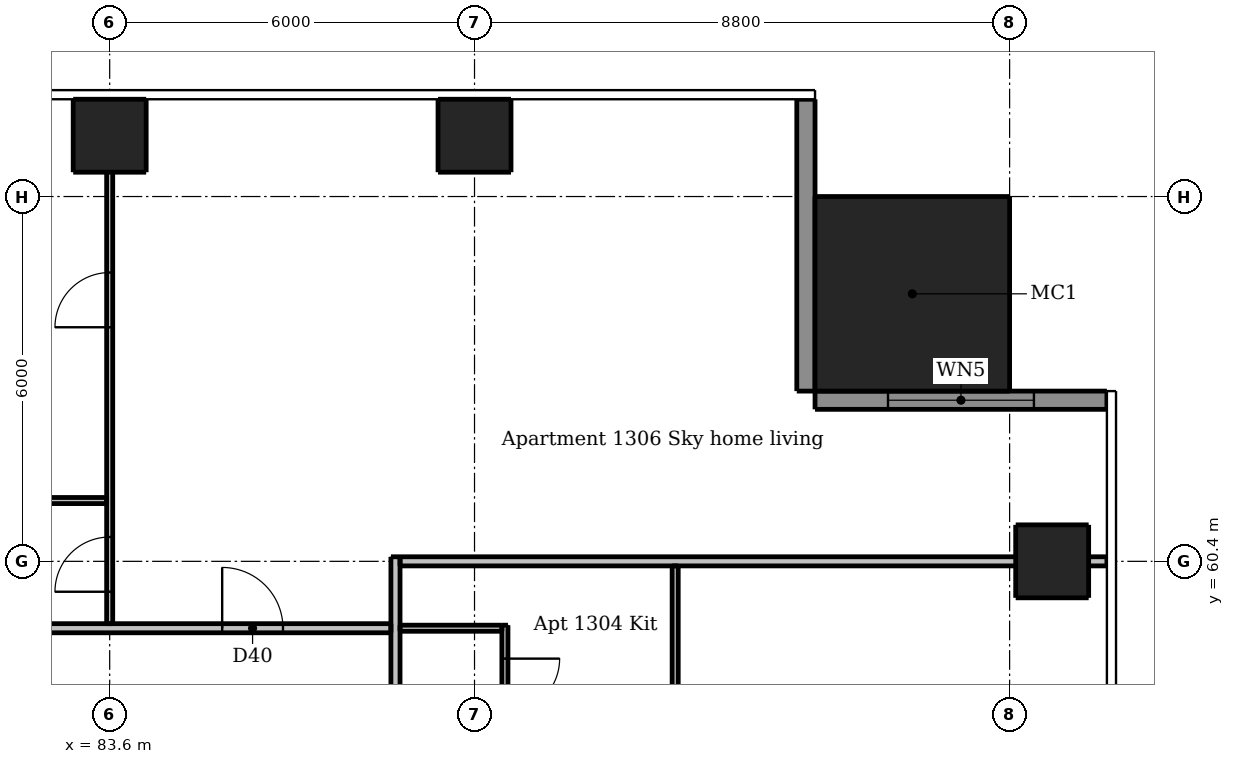
"""IFC4 building model, lengths in metres.
Left out: names, types, materials, properties, quantities, classifications, styles, units other than length and angle.
Written with IfcOpenShell. Run it as: python <this file> out.ifc"""

import sys

from ifc_helpers import new_model, si_unit, direction, frame, frame_2d, origin, origin_2d, place, context, subcontext, project, spatial, rectangle, extrude, element, fill, save


model = new_model("IFC4")
c1 = context("Model", 3, precision=1e-05, world=origin(), true_north=direction((0.0, 1.0)))
c2 = subcontext(c1, "Body", "Model", "MODEL_VIEW")
j1 = project(units=[si_unit("LENGTHUNIT", "METRE"), si_unit("PLANEANGLEUNIT", "RADIAN")], contexts=[c1])
p1 = place(None, origin())
s1 = spatial("IfcSite", under=j1, at=p1, CompositionType="ELEMENT")
p2 = place(p1, origin())
s2 = spatial("IfcBuilding", under=s1, at=p2, CompositionType="ELEMENT")
p3 = place(p2, frame((0.0, 0.0, 49.9)))
s3 = spatial("IfcBuildingStorey", under=s2, at=p3, CompositionType="ELEMENT", Elevation=49.9)
for number, where, z_axis, x_axis in (
    (1, (99.1, 60.4, 0.0), (0.0, 0.0, 1.0), (1.0, 0.0, 0.0)),
    (2, (83.6, 67.4, 0.0), (0.0, 0.0, 1.0), (1.0, 0.0, 0.0)),
    (3, (89.6, 67.4, 0.0), (0.0, 0.0, 1.0), (1.0, 0.0, 0.0)),
):
    element("IfcColumn", number, at=place(p3, frame(where, z_axis=z_axis, x_axis=x_axis)), inside=s3, PredefinedType="COLUMN", context=c2, shape_type="SweptSolid", body=[
        extrude(rectangle(XDim=1.2, YDim=1.2, at=origin_2d()), origin(), (0.0, 0.0, 1.0), 3.05),
    ])
p4 = place(p3, frame((96.8, 64.8, 0.0), z_axis=(0.0, 0.0, 1.0), x_axis=(1.0, 0.0, 0.0)))
e4 = element("IfcColumn", 4, at=p4, inside=s3, PredefinedType="COLUMN", context=c2, shape_type="SweptSolid", body=[
    extrude(rectangle(XDim=3.2, YDim=3.2, at=origin_2d()), origin(), (0.0, 0.0, 1.0), 3.3),
])
p5 = place(p3, frame((100.0, 63.05, 0.0), z_axis=(0.0, 0.0, 1.0), x_axis=(-1.0, 0.0, 0.0)))
e5 = element("IfcWall", 5, at=p5, inside=s3, PredefinedType="SOLIDWALL", context=c2, shape_type="SweptSolid", body=[
    extrude(rectangle(XDim=4.8, YDim=0.3, at=frame_2d((2.4, 0.0))), origin(), (0.0, 0.0, 1.0), 3.05),
])
p6 = place(p5, frame((1.2, 0.0, 0.15)))
e6 = element("IfcOpeningElement", 6, at=p6, cuts=e5, PredefinedType="OPENING", context=c2, shape_type="SweptSolid", body=[
    extrude(rectangle(XDim=2.4, YDim=2.1, at=frame_2d((1.2, 1.05))), frame((0.0, 0.16, 0.0), z_axis=(0.0, -1.0, 0.0), x_axis=(1.0, 0.0, 0.0)), (0.0, 0.0, 1.0), 0.32),
])
p7 = place(p3, frame((95.05, 63.2, 0.0), z_axis=(0.0, 0.0, 1.0), x_axis=(0.0, 1.0, 0.0)))
e7 = element("IfcWall", 7, at=p7, inside=s3, PredefinedType="SOLIDWALL", context=c2, shape_type="SweptSolid", body=[
    extrude(rectangle(XDim=4.8, YDim=0.3, at=frame_2d((2.4, 0.0))), origin(), (0.0, 0.0, 1.0), 3.05),
])
p8 = place(p3, frame((83.6, 59.375, 0.0), z_axis=(0.0, 0.0, 1.0), x_axis=(0.0, 1.0, 0.0)))
e8 = element("IfcWall", 8, at=p8, inside=s3, PredefinedType="PARTITIONING", context=c2, shape_type="SweptSolid", body=[
    extrude(rectangle(XDim=8.625, YDim=0.1, at=frame_2d((4.312, 0.0))), origin(), (0.0, 0.0, 1.0), 2.516),
])
p9 = place(p8, frame((0.525, 0.0, 0.0)))
e9 = element("IfcOpeningElement", 9, at=p9, cuts=e8, PredefinedType="OPENING", context=c2, shape_type="SweptSolid", body=[
    extrude(rectangle(XDim=0.9, YDim=2.1, at=frame_2d((0.45, 1.05))), frame((0.0, 0.06, 0.0), z_axis=(0.0, -1.0, 0.0), x_axis=(1.0, 0.0, 0.0)), (0.0, 0.0, 1.0), 0.12),
])
p10 = place(p8, frame((4.875, 0.0, 0.0)))
e10 = element("IfcOpeningElement", 10, at=p10, cuts=e8, PredefinedType="OPENING", context=c2, shape_type="SweptSolid", body=[
    extrude(rectangle(XDim=0.9, YDim=2.1, at=frame_2d((0.45, 1.05))), frame((0.0, 0.06, 0.0), z_axis=(0.0, -1.0, 0.0), x_axis=(1.0, 0.0, 0.0)), (0.0, 0.0, 1.0), 0.12),
])
p11 = place(p3, frame((90.1, 59.35, 0.0), z_axis=(0.0, 0.0, 1.0), x_axis=(0.0, -1.0, 0.0)))
e11 = element("IfcWall", 11, at=p11, inside=s3, PredefinedType="PARTITIONING", context=c2, shape_type="SweptSolid", body=[
    extrude(rectangle(XDim=19.775, YDim=0.1, at=frame_2d((9.888, 0.0))), origin(), (0.0, 0.0, 1.0), 3.05),
])
p12 = place(p11, frame((4.45, 0.0, 0.0)))
e12 = element("IfcOpeningElement", 12, at=p12, cuts=e11, PredefinedType="OPENING", context=c2, shape_type="SweptSolid", body=[
    extrude(rectangle(XDim=0.9, YDim=2.1, at=frame_2d((0.45, 1.05))), frame((0.0, 0.06, 0.0), z_axis=(0.0, -1.0, 0.0), x_axis=(1.0, 0.0, 0.0)), (0.0, 0.0, 1.0), 0.12),
])
p13 = place(p11, frame((0.55, 0.0, 0.0)))
e13 = element("IfcOpeningElement", 13, at=p13, cuts=e11, PredefinedType="OPENING", context=c2, shape_type="SweptSolid", body=[
    extrude(rectangle(XDim=0.9, YDim=2.1, at=frame_2d((0.45, 1.05))), frame((0.0, 0.06, 0.0), z_axis=(0.0, -1.0, 0.0), x_axis=(1.0, 0.0, 0.0)), (0.0, 0.0, 1.0), 0.12),
])
p14 = place(p11, frame((17.6, 0.0, 0.0)))
e14 = element("IfcOpeningElement", 14, at=p14, cuts=e11, PredefinedType="OPENING", context=c2, shape_type="SweptSolid", body=[
    extrude(rectangle(XDim=0.9, YDim=2.1, at=frame_2d((0.45, 1.05))), frame((0.0, 0.06, 0.0), z_axis=(0.0, -1.0, 0.0), x_axis=(1.0, 0.0, 0.0)), (0.0, 0.0, 1.0), 0.12),
])
p15 = place(p11, frame((11.6, 0.0, 0.0)))
e15 = element("IfcOpeningElement", 15, at=p15, cuts=e11, PredefinedType="OPENING", context=c2, shape_type="SweptSolid", body=[
    extrude(rectangle(XDim=0.9, YDim=2.1, at=frame_2d((0.45, 1.05))), frame((0.0, 0.06, 0.0), z_axis=(0.0, -1.0, 0.0), x_axis=(1.0, 0.0, 0.0)), (0.0, 0.0, 1.0), 0.12),
])
p16 = place(p11, frame((14.65, 0.0, 0.0)))
e16 = element("IfcOpeningElement", 16, at=p16, cuts=e11, PredefinedType="OPENING", context=c2, shape_type="SweptSolid", body=[
    extrude(rectangle(XDim=0.8, YDim=2.1, at=frame_2d((0.4, 1.05))), frame((0.0, 0.06, 0.0), z_axis=(0.0, -1.0, 0.0), x_axis=(1.0, 0.0, 0.0)), (0.0, 0.0, 1.0), 0.12),
])
p17 = place(p11, frame((8.65, 0.0, 0.0)))
e17 = element("IfcOpeningElement", 17, at=p17, cuts=e11, PredefinedType="OPENING", context=c2, shape_type="SweptSolid", body=[
    extrude(rectangle(XDim=0.8, YDim=2.1, at=frame_2d((0.4, 1.05))), frame((0.0, 0.06, 0.0), z_axis=(0.0, -1.0, 0.0), x_axis=(1.0, 0.0, 0.0)), (0.0, 0.0, 1.0), 0.12),
])
p18 = place(p3, frame((92.9, 57.35, 0.0), z_axis=(0.0, 0.0, 1.0), x_axis=(0.0, 1.0, 0.0)))
e18 = element("IfcWall", 18, at=p18, inside=s3, PredefinedType="PARTITIONING", context=c2, shape_type="SweptSolid", body=[
    extrude(rectangle(XDim=2.975, YDim=0.1, at=frame_2d((1.487, 0.0))), origin(), (0.0, 0.0, 1.0), 3.05),
])
p19 = place(p3, frame((83.55, 61.4, 0.0), z_axis=(0.0, 0.0, 1.0), x_axis=(-1.0, 0.0, 0.0)))
e19 = element("IfcWall", 19, at=p19, inside=s3, PredefinedType="PARTITIONING", context=c2, shape_type="SweptSolid", body=[
    extrude(rectangle(XDim=5.875, YDim=0.1, at=frame_2d((2.938, 0.0))), origin(), (0.0, 0.0, 1.0), 3.05),
])
p20 = place(p19, frame((3.75, 0.0, 0.0)))
e20 = element("IfcOpeningElement", 20, at=p20, cuts=e19, PredefinedType="OPENING", context=c2, shape_type="SweptSolid", body=[
    extrude(rectangle(XDim=0.8, YDim=2.1, at=frame_2d((0.4, 1.05))), frame((0.0, 0.06, 0.0), z_axis=(0.0, -1.0, 0.0), x_axis=(1.0, 0.0, 0.0)), (0.0, 0.0, 1.0), 0.12),
])
p21 = place(p3, frame((88.375, 59.3, 0.0), z_axis=(0.0, 0.0, 1.0), x_axis=(1.0, 0.0, 0.0)))
e21 = element("IfcWall", 21, at=p21, inside=s3, PredefinedType="PARTITIONING", context=c2, shape_type="SweptSolid", body=[
    extrude(rectangle(XDim=1.675, YDim=0.1, at=frame_2d((0.837, 0.0))), origin(), (0.0, 0.0, 1.0), 3.05),
])
p22 = place(p3, frame((88.3, 60.475, 0.0), z_axis=(0.0, 0.0, 1.0), x_axis=(0.0, -1.0, 0.0)))
e22 = element("IfcWall", 22, at=p22, inside=s3, PredefinedType="PARTITIONING", context=c2, shape_type="SweptSolid", body=[
    extrude(rectangle(XDim=28.7, YDim=0.15, at=frame_2d((14.35, 0.0))), origin(), (0.0, 0.0, 1.0), 3.05),
])
p23 = place(p22, frame((27.425, 0.0, 0.0)))
e23 = element("IfcOpeningElement", 23, at=p23, cuts=e22, PredefinedType="OPENING", context=c2, shape_type="SweptSolid", body=[
    extrude(rectangle(XDim=1.0, YDim=2.1, at=frame_2d((0.5, 1.05))), frame((0.0, 0.085, 0.0), z_axis=(0.0, -1.0, 0.0), x_axis=(1.0, 0.0, 0.0)), (0.0, 0.0, 1.0), 0.17),
])
p24 = place(p22, frame((10.575, 0.0, 0.0)))
e24 = element("IfcOpeningElement", 24, at=p24, cuts=e22, PredefinedType="OPENING", context=c2, shape_type="SweptSolid", body=[
    extrude(rectangle(XDim=1.0, YDim=2.1, at=frame_2d((0.5, 1.05))), frame((0.0, 0.085, 0.0), z_axis=(0.0, -1.0, 0.0), x_axis=(1.0, 0.0, 0.0)), (0.0, 0.0, 1.0), 0.17),
])
p25 = place(p3, frame((88.375, 60.4, 0.0), z_axis=(0.0, 0.0, 1.0), x_axis=(1.0, 0.0, 0.0)))
e25 = element("IfcWall", 25, at=p25, inside=s3, PredefinedType="PARTITIONING", context=c2, shape_type="SweptSolid", body=[
    extrude(rectangle(XDim=11.625, YDim=0.15, at=frame_2d((5.812, 0.0))), origin(), (0.0, 0.0, 1.0), 2.516),
])
p26 = place(p3, frame((59.675, 59.3, 0.0), z_axis=(0.0, 0.0, 1.0), x_axis=(1.0, 0.0, 0.0)))
e26 = element("IfcWall", 26, at=p26, inside=s3, PredefinedType="PARTITIONING", context=c2, shape_type="SweptSolid", body=[
    extrude(rectangle(XDim=28.55, YDim=0.15, at=frame_2d((14.275, 0.0))), origin(), (0.0, 0.0, 1.0), 3.05),
])
p27 = place(p26, frame((8.975, 0.0, 0.0)))
e27 = element("IfcOpeningElement", 27, at=p27, cuts=e26, PredefinedType="OPENING", context=c2, shape_type="SweptSolid", body=[
    extrude(rectangle(XDim=1.0, YDim=2.1, at=frame_2d((0.5, 1.05))), frame((0.0, 0.085, 0.0), z_axis=(0.0, -1.0, 0.0), x_axis=(1.0, 0.0, 0.0)), (0.0, 0.0, 1.0), 0.17),
])
p28 = place(p26, frame((25.775, 0.0, 0.0)))
e28 = element("IfcOpeningElement", 28, at=p28, cuts=e26, PredefinedType="OPENING", context=c2, shape_type="SweptSolid", body=[
    extrude(rectangle(XDim=1.0, YDim=2.1, at=frame_2d((0.5, 1.05))), frame((0.0, 0.085, 0.0), z_axis=(0.0, -1.0, 0.0), x_axis=(1.0, 0.0, 0.0)), (0.0, 0.0, 1.0), 0.17),
])
p29 = place(p6, origin())
e29 = element("IfcWindow", 29, at=p29, inside=s3, PartitioningType="DOUBLE_PANEL_VERTICAL", PredefinedType="WINDOW", context=c2, shape_type="SweptSolid", body=[
    extrude(rectangle(XDim=2.4, YDim=2.1, at=frame_2d((1.2, 1.05))), frame((0.0, 0.03, 0.0), z_axis=(0.0, -1.0, 0.0), x_axis=(1.0, 0.0, 0.0)), (0.0, 0.0, 1.0), 0.06),
])
fill(e6, e29)
p30 = place(p13, origin())
e30 = element("IfcDoor", 30, at=p30, inside=s3, OperationType="SINGLE_SWING_LEFT", PredefinedType="DOOR", context=c2, shape_type="SweptSolid", body=[
    extrude(rectangle(XDim=0.9, YDim=2.1, at=frame_2d((0.45, 1.05))), frame((0.0, 0.025, 0.0), z_axis=(0.0, -1.0, 0.0), x_axis=(1.0, 0.0, 0.0)), (0.0, 0.0, 1.0), 0.05),
])
fill(e13, e30)
p31 = place(p28, origin())
e31 = element("IfcDoor", 31, at=p31, inside=s3, OperationType="SINGLE_SWING_LEFT", PredefinedType="DOOR", context=c2, shape_type="SweptSolid", body=[
    extrude(rectangle(XDim=1.0, YDim=2.1, at=frame_2d((0.5, 1.05))), frame((0.0, 0.025, 0.0), z_axis=(0.0, -1.0, 0.0), x_axis=(1.0, 0.0, 0.0)), (0.0, 0.0, 1.0), 0.05),
])
fill(e28, e31)
p32 = place(p9, origin())
e32 = element("IfcDoor", 32, at=p32, inside=s3, OperationType="SINGLE_SWING_LEFT", PredefinedType="DOOR", context=c2, shape_type="SweptSolid", body=[
    extrude(rectangle(XDim=0.9, YDim=2.1, at=frame_2d((0.45, 1.05))), frame((0.0, 0.025, 0.0), z_axis=(0.0, -1.0, 0.0), x_axis=(1.0, 0.0, 0.0)), (0.0, 0.0, 1.0), 0.05),
])
fill(e9, e32)
p33 = place(p10, origin())
e33 = element("IfcDoor", 33, at=p33, inside=s3, OperationType="SINGLE_SWING_LEFT", PredefinedType="DOOR", context=c2, shape_type="SweptSolid", body=[
    extrude(rectangle(XDim=0.9, YDim=2.1, at=frame_2d((0.45, 1.05))), frame((0.0, 0.025, 0.0), z_axis=(0.0, -1.0, 0.0), x_axis=(1.0, 0.0, 0.0)), (0.0, 0.0, 1.0), 0.05),
])
fill(e10, e33)
save(model, sys.argv[1])
